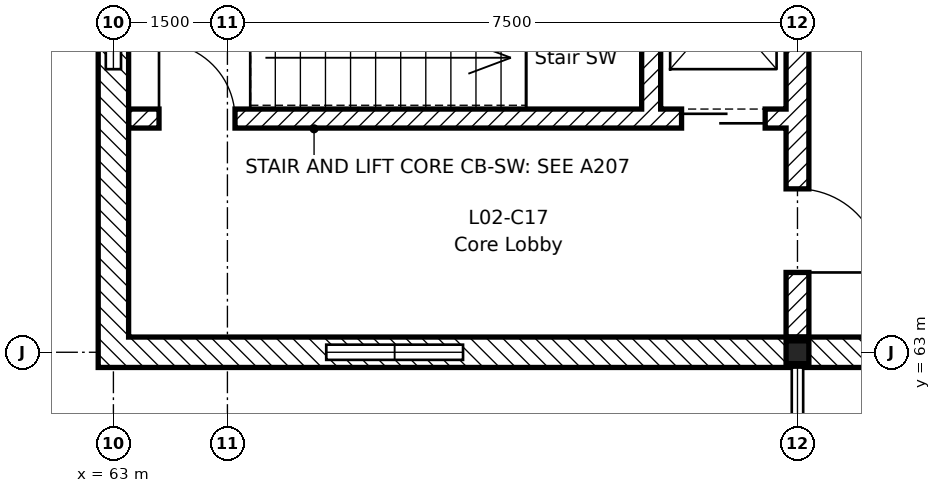
"""IFC4 building model, lengths in metres.
Left out: names, types, materials, properties, quantities, classifications, styles, units other than length and angle.
Written with IfcOpenShell. Run it as: python <this file> out.ifc"""

import sys

from ifc_helpers import new_model, si_unit, direction, frame, frame_2d, origin, origin_2d, place, context, subcontext, project, spatial, rectangle, i_section, extrude, element, fill, save


model = new_model("IFC4")
c1 = context("Model", 3, precision=1e-05, world=origin(), true_north=direction((0.0, 1.0)))
c2 = subcontext(c1, "Body", "Model", "MODEL_VIEW")
j1 = project(units=[si_unit("LENGTHUNIT", "METRE"), si_unit("PLANEANGLEUNIT", "RADIAN")], contexts=[c1])
p1 = place(None, origin())
s1 = spatial("IfcSite", under=j1, at=p1, CompositionType="ELEMENT")
p2 = place(p1, origin())
s2 = spatial("IfcBuilding", under=s1, at=p2, CompositionType="ELEMENT")
p3 = place(p2, frame((0.0, 0.0, 9.9)))
s3 = spatial("IfcBuildingStorey", under=s2, at=p3, CompositionType="ELEMENT", Elevation=9.9)
p4 = place(p3, frame((72.0, 63.0, -0.2), z_axis=(0.0, 0.0, 1.0), x_axis=(1.0, 0.0, 0.0)))
e1 = element("IfcColumn", 1, at=p4, inside=s3, PredefinedType="COLUMN", context=c2, shape_type="SweptSolid", body=[
    extrude(i_section(OverallWidth=0.3, OverallDepth=0.3, WebThickness=0.011, FlangeThickness=0.019, FilletRadius=0.027, at=origin_2d()), origin(), (0.0, 0.0, 1.0), 4.45),
])
p5 = place(p3, frame((72.0, 63.2, 0.0), z_axis=(0.0, 0.0, 1.0), x_axis=(0.0, 1.0, 0.0)))
e2 = element("IfcWall", 2, at=p5, inside=s3, PredefinedType="SHEAR", context=c2, shape_type="SweptSolid", body=[
    extrude(rectangle(XDim=8.95, YDim=0.3, at=frame_2d((4.475, 0.0))), origin(), (0.0, 0.0, 1.0), 4.3),
])
p6 = place(p5, frame((0.85, 0.0, 0.0)))
e3 = element("IfcOpeningElement", 3, at=p6, cuts=e2, PredefinedType="OPENING", context=c2, shape_type="SweptSolid", body=[
    extrude(rectangle(XDim=1.1, YDim=2.1, at=frame_2d((0.55, 1.05))), frame((0.0, 0.16, 0.0), z_axis=(0.0, -1.0, 0.0), x_axis=(1.0, 0.0, 0.0)), (0.0, 0.0, 1.0), 0.32),
])
p7 = place(p3, frame((63.2, 66.075, 0.0), z_axis=(0.0, 0.0, 1.0), x_axis=(1.0, 0.0, 0.0)))
e4 = element("IfcWall", 4, at=p7, inside=s3, PredefinedType="SHEAR", context=c2, shape_type="SweptSolid", body=[
    extrude(rectangle(XDim=8.65, YDim=0.25, at=frame_2d((4.325, 0.0))), origin(), (0.0, 0.0, 1.0), 4.3),
])
p8 = place(p7, frame((0.4, 0.0, 0.0)))
e5 = element("IfcOpeningElement", 5, at=p8, cuts=e4, PredefinedType="OPENING", context=c2, shape_type="SweptSolid", body=[
    extrude(rectangle(XDim=1.0, YDim=2.1, at=frame_2d((0.5, 1.05))), frame((0.0, 0.135, 0.0), z_axis=(0.0, -1.0, 0.0), x_axis=(1.0, 0.0, 0.0)), (0.0, 0.0, 1.0), 0.27),
])
p9 = place(p7, frame((7.275, 0.0, 0.0)))
e6 = element("IfcOpeningElement", 6, at=p9, cuts=e4, PredefinedType="OPENING", context=c2, shape_type="SweptSolid", body=[
    extrude(rectangle(XDim=1.1, YDim=2.1, at=frame_2d((0.55, 1.05))), frame((0.0, 0.135, 0.0), z_axis=(0.0, -1.0, 0.0), x_axis=(1.0, 0.0, 0.0)), (0.0, 0.0, 1.0), 0.27),
])
p10 = place(p3, frame((70.075, 66.2, 0.0), z_axis=(0.0, 0.0, 1.0), x_axis=(0.0, 1.0, 0.0)))
e7 = element("IfcWall", 7, at=p10, inside=s3, PredefinedType="SHEAR", context=c2, shape_type="SweptSolid", body=[
    extrude(rectangle(XDim=2.85, YDim=0.25, at=frame_2d((1.425, 0.0))), origin(), (0.0, 0.0, 1.0), 4.3),
])
p11 = place(p3, frame((62.8, 63.0, 0.0), z_axis=(0.0, 0.0, 1.0), x_axis=(1.0, 0.0, 0.0)))
e8 = element("IfcWall", 8, at=p11, inside=s3, PredefinedType="STANDARD", context=c2, shape_type="SweptSolid", body=[
    extrude(rectangle(XDim=3.0, YDim=0.4, at=frame_2d((1.5, 0.0))), origin(), (0.0, 0.0, 1.0), 4.3),
])
p12 = place(p3, frame((67.6, 63.0, 0.0), z_axis=(0.0, 0.0, 1.0), x_axis=(1.0, 0.0, 0.0)))
e9 = element("IfcWall", 9, at=p12, inside=s3, PredefinedType="STANDARD", context=c2, shape_type="SweptSolid", body=[
    extrude(rectangle(XDim=4.4, YDim=0.4, at=frame_2d((2.2, 0.0))), origin(), (0.0, 0.0, 1.0), 4.3),
])
p13 = place(p3, frame((65.8, 63.0, 0.0), z_axis=(0.0, 0.0, 1.0), x_axis=(1.0, 0.0, 0.0)))
e10 = element("IfcWall", 10, at=p13, inside=s3, PredefinedType="STANDARD", context=c2, shape_type="SweptSolid", body=[
    extrude(rectangle(XDim=1.8, YDim=0.4, at=frame_2d((0.9, 0.0))), origin(), (0.0, 0.0, 1.0), 0.9),
])
p14 = place(p3, frame((72.0, 63.0, 0.0), z_axis=(0.0, 0.0, 1.0), x_axis=(1.0, 0.0, 0.0)))
e11 = element("IfcWall", 11, at=p14, inside=s3, PredefinedType="STANDARD", context=c2, shape_type="SweptSolid", body=[
    extrude(rectangle(XDim=27.0, YDim=0.4, at=frame_2d((13.5, 0.0))), origin(), (0.0, 0.0, 1.0), 3.76),
])
p15 = place(p3, frame((63.0, 63.2, 0.0), z_axis=(0.0, 0.0, 1.0), x_axis=(0.0, 1.0, 0.0)))
e12 = element("IfcWall", 12, at=p15, inside=s3, PredefinedType="STANDARD", context=c2, shape_type="SweptSolid", body=[
    extrude(rectangle(XDim=3.525, YDim=0.4, at=frame_2d((1.763, 0.0))), origin(), (0.0, 0.0, 1.0), 4.3),
])
p16 = place(p3, frame((63.0, 66.725, 0.0), z_axis=(0.0, 0.0, 1.0), x_axis=(0.0, 1.0, 0.0)))
e13 = element("IfcWall", 13, at=p16, inside=s3, PredefinedType="STANDARD", context=c2, shape_type="SweptSolid", body=[
    extrude(rectangle(XDim=1.8, YDim=0.4, at=frame_2d((0.9, 0.0))), origin(), (0.0, 0.0, 1.0), 0.9),
])
p17 = place(p8, origin())
e14 = element("IfcDoor", 14, at=p17, inside=s3, OperationType="SINGLE_SWING_LEFT", PredefinedType="DOOR", context=c2, shape_type="SweptSolid", body=[
    extrude(rectangle(XDim=1.0, YDim=2.1, at=frame_2d((0.5, 1.05))), frame((0.0, 0.025, 0.0), z_axis=(0.0, -1.0, 0.0), x_axis=(1.0, 0.0, 0.0)), (0.0, 0.0, 1.0), 0.05),
])
fill(e5, e14)
p18 = place(p6, frame((1.1, 0.0, 0.0), z_axis=(0.0, 0.0, 1.0), x_axis=(-1.0, 0.0, 0.0)))
e15 = element("IfcDoor", 15, at=p18, inside=s3, OperationType="SINGLE_SWING_RIGHT", PredefinedType="DOOR", context=c2, shape_type="SweptSolid", body=[
    extrude(rectangle(XDim=1.1, YDim=2.1, at=frame_2d((0.55, 1.05))), frame((0.0, 0.025, 0.0), z_axis=(0.0, -1.0, 0.0), x_axis=(1.0, 0.0, 0.0)), (0.0, 0.0, 1.0), 0.05),
])
fill(e3, e15)
p19 = place(p9, frame((1.1, 0.0, 0.0), z_axis=(0.0, 0.0, 1.0), x_axis=(-1.0, 0.0, 0.0)))
e16 = element("IfcDoor", 16, at=p19, inside=s3, OperationType="SLIDING_TO_LEFT", PredefinedType="DOOR", context=c2, shape_type="SweptSolid", body=[
    extrude(rectangle(XDim=1.1, YDim=2.1, at=frame_2d((0.55, 1.05))), frame((0.0, 0.025, 0.0), z_axis=(0.0, -1.0, 0.0), x_axis=(1.0, 0.0, 0.0)), (0.0, 0.0, 1.0), 0.05),
])
fill(e6, e16)
save(model, sys.argv[1])
